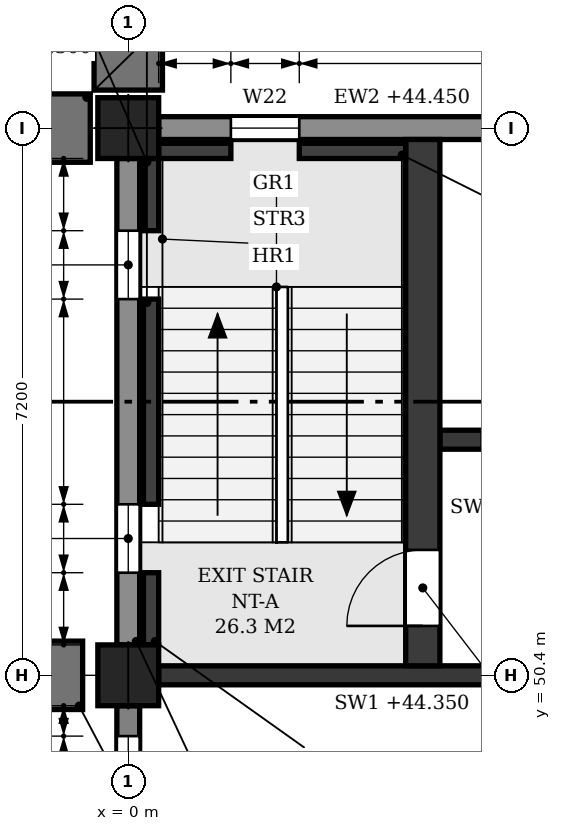
"""IFC4 building model, lengths in metres.
Left out: names, types, materials, properties, quantities, classifications, styles, units other than length and angle.
Written with IfcOpenShell. Run it as: python <this file> out.ifc"""

import sys

from ifc_helpers import new_model, si_unit, direction, frame, frame_2d, origin, origin_2d, place, context, subcontext, project, spatial, polyline, rectangle, outline, extrude, element, fill, save


model = new_model("IFC4")
c1 = context("Model", 3, precision=1e-05, world=origin(), true_north=direction((0.0, 1.0)))
c2 = subcontext(c1, "Body", "Model", "MODEL_VIEW")
j1 = project(units=[si_unit("LENGTHUNIT", "METRE"), si_unit("PLANEANGLEUNIT", "RADIAN")], contexts=[c1])
p1 = place(None, origin())
s1 = spatial("IfcSite", under=j1, at=p1, CompositionType="ELEMENT")
p2 = place(p1, origin())
s2 = spatial("IfcBuilding", under=s1, at=p2, CompositionType="ELEMENT")
p3 = place(p2, frame((0.0, 0.0, 40.8)))
s3 = spatial("IfcBuildingStorey", under=s2, at=p3, CompositionType="ELEMENT", Elevation=40.8)
for number, where, z_axis, x_axis in (
    (1, (0.0, 50.4, 0.0), (0.0, 0.0, 1.0), (1.0, 0.0, 0.0)),
    (2, (0.0, 57.6, 0.0), (0.0, 0.0, 1.0), (1.0, 0.0, 0.0)),
):
    element("IfcColumn", number, at=place(p3, frame(where, z_axis=z_axis, x_axis=x_axis)), inside=s3, PredefinedType="COLUMN", context=c2, shape_type="SweptSolid", body=[
        extrude(rectangle(XDim=0.8, YDim=0.8, at=origin_2d()), origin(), (0.0, 0.0, 1.0), 4.5),
    ])
p4 = place(p3, frame((0.0, 43.6, 0.0), z_axis=(0.0, 0.0, 1.0), x_axis=(0.0, 1.0, 0.0)))
e3 = element("IfcWall", 3, at=p4, inside=s3, PredefinedType="STANDARD", context=c2, shape_type="SweptSolid", body=[
    extrude(rectangle(XDim=6.4, YDim=0.3, at=frame_2d((3.2, 0.0))), origin(), (0.0, 0.0, 1.0), 3.65),
])
p5 = place(p4, frame((0.4, 0.0, 0.9)))
e4 = element("IfcOpeningElement", 4, at=p5, cuts=e3, PredefinedType="OPENING", context=c2, shape_type="SweptSolid", body=[
    extrude(outline(polyline([(0.0, 0.0), (0.85, 0.0), (0.85, 2.25), (0.425, 2.7), (0.0, 2.25), (0.0, 0.0)])), frame((0.0, 0.16, 0.0), z_axis=(0.0, -1.0, 0.0), x_axis=(1.0, 0.0, 0.0)), (0.0, 0.0, 1.0), 0.32),
])
p6 = place(p4, frame((1.55, 0.0, 0.9)))
e5 = element("IfcOpeningElement", 5, at=p6, cuts=e3, PredefinedType="OPENING", context=c2, shape_type="SweptSolid", body=[
    extrude(outline(polyline([(0.0, 0.0), (0.85, 0.0), (0.85, 2.25), (0.425, 2.7), (0.0, 2.25), (0.0, 0.0)])), frame((0.0, 0.16, 0.0), z_axis=(0.0, -1.0, 0.0), x_axis=(1.0, 0.0, 0.0)), (0.0, 0.0, 1.0), 0.32),
])
p7 = place(p4, frame((4.0, 0.0, 0.9)))
e6 = element("IfcOpeningElement", 6, at=p7, cuts=e3, PredefinedType="OPENING", context=c2, shape_type="SweptSolid", body=[
    extrude(outline(polyline([(0.0, 0.0), (0.85, 0.0), (0.85, 2.25), (0.425, 2.7), (0.0, 2.25), (0.0, 0.0)])), frame((0.0, 0.16, 0.0), z_axis=(0.0, -1.0, 0.0), x_axis=(1.0, 0.0, 0.0)), (0.0, 0.0, 1.0), 0.32),
])
p8 = place(p4, frame((5.15, 0.0, 0.9)))
e7 = element("IfcOpeningElement", 7, at=p8, cuts=e3, PredefinedType="OPENING", context=c2, shape_type="SweptSolid", body=[
    extrude(outline(polyline([(0.0, 0.0), (0.85, 0.0), (0.85, 2.25), (0.425, 2.7), (0.0, 2.25), (0.0, 0.0)])), frame((0.0, 0.16, 0.0), z_axis=(0.0, -1.0, 0.0), x_axis=(1.0, 0.0, 0.0)), (0.0, 0.0, 1.0), 0.32),
])
p9 = place(p3, frame((0.0, 50.8, 0.0), z_axis=(0.0, 0.0, 1.0), x_axis=(0.0, 1.0, 0.0)))
e8 = element("IfcWall", 8, at=p9, inside=s3, PredefinedType="STANDARD", context=c2, shape_type="SweptSolid", body=[
    extrude(rectangle(XDim=6.4, YDim=0.3, at=frame_2d((3.2, 0.0))), origin(), (0.0, 0.0, 1.0), 3.65),
])
p10 = place(p9, frame((0.95, 0.0, 0.9)))
e9 = element("IfcOpeningElement", 9, at=p10, cuts=e8, PredefinedType="OPENING", context=c2, shape_type="SweptSolid", body=[
    extrude(outline(polyline([(0.0, 0.0), (0.9, 0.0), (0.9, 2.25), (0.45, 2.7), (0.0, 2.25), (0.0, 0.0)])), frame((0.0, 0.16, 0.0), z_axis=(0.0, -1.0, 0.0), x_axis=(1.0, 0.0, 0.0)), (0.0, 0.0, 1.0), 0.32),
])
p11 = place(p9, frame((4.55, 0.0, 0.9)))
e10 = element("IfcOpeningElement", 10, at=p11, cuts=e8, PredefinedType="OPENING", context=c2, shape_type="SweptSolid", body=[
    extrude(outline(polyline([(0.0, 0.0), (0.9, 0.0), (0.9, 2.25), (0.45, 2.7), (0.0, 2.25), (0.0, 0.0)])), frame((0.0, 0.16, 0.0), z_axis=(0.0, -1.0, 0.0), x_axis=(1.0, 0.0, 0.0)), (0.0, 0.0, 1.0), 0.32),
])
p12 = place(p3, frame((6.8, 57.6, 0.0), z_axis=(0.0, 0.0, 1.0), x_axis=(-1.0, 0.0, 0.0)))
e11 = element("IfcWall", 11, at=p12, inside=s3, PredefinedType="STANDARD", context=c2, shape_type="SweptSolid", body=[
    extrude(rectangle(XDim=6.4, YDim=0.3, at=frame_2d((3.2, 0.0))), origin(), (0.0, 0.0, 1.0), 3.65),
])
p13 = place(p12, frame((4.55, 0.0, 0.9)))
e12 = element("IfcOpeningElement", 12, at=p13, cuts=e11, PredefinedType="OPENING", context=c2, shape_type="SweptSolid", body=[
    extrude(outline(polyline([(0.0, 0.0), (0.9, 0.0), (0.9, 2.25), (0.45, 2.7), (0.0, 2.25), (0.0, 0.0)])), frame((0.0, 0.16, 0.0), z_axis=(0.0, -1.0, 0.0), x_axis=(1.0, 0.0, 0.0)), (0.0, 0.0, 1.0), 0.32),
])
for number, where, z_axis, x_axis in (
    (13, (-0.6, 50.4, -0.25), (0.0, 0.0, 1.0), (-1.0, 0.0, 0.0)),
    (14, (-0.5, 57.6, -0.25), (0.0, 0.0, 1.0), (-1.0, 0.0, 0.0)),
    (15, (0.0, 58.1, -0.25), (0.0, 0.0, 1.0), (0.0, 1.0, 0.0)),
):
    element("IfcWall", number, at=place(p3, frame(where, z_axis=z_axis, x_axis=x_axis)), inside=s3, PredefinedType="POLYGONAL", context=c2, shape_type="SweptSolid", body=[
        extrude(outline(polyline([(1.1, 0.0), (1.1, 12.325), (0.15, 13.75), (0.0, 13.75), (0.0, 0.0), (1.1, 0.0)])), frame((0.0, 0.45, 0.0), z_axis=(0.0, -1.0, 0.0), x_axis=(1.0, 0.0, 0.0)), (0.0, 0.0, 1.0), 0.9),
    ])
p14 = place(p3, frame((0.4, 50.4, 0.0), z_axis=(0.0, 0.0, 1.0), x_axis=(1.0, 0.0, 0.0)))
e16 = element("IfcWall", 16, at=p14, inside=s3, PredefinedType="SHEAR", context=c2, shape_type="SweptSolid", body=[
    extrude(rectangle(XDim=6.4, YDim=0.25, at=frame_2d((3.2, 0.0))), origin(), (0.0, 0.0, 1.0), 3.55),
])
p15 = place(p14, frame((4.85, 0.0, 0.0)))
e17 = element("IfcOpeningElement", 17, at=p15, cuts=e16, PredefinedType="OPENING", context=c2, shape_type="SweptSolid", body=[
    extrude(rectangle(XDim=1.1, YDim=2.1, at=frame_2d((0.55, 1.05))), frame((0.0, 0.135, 0.0), z_axis=(0.0, -1.0, 0.0), x_axis=(1.0, 0.0, 0.0)), (0.0, 0.0, 1.0), 0.27),
])
p16 = place(p3, frame((0.3, 50.8, -0.25), z_axis=(0.0, 0.0, 1.0), x_axis=(0.0, 1.0, 0.0)))
e18 = element("IfcWall", 18, at=p16, inside=s3, PredefinedType="SHEAR", context=c2, shape_type="SweptSolid", body=[
    extrude(rectangle(XDim=0.95, YDim=0.2, at=frame_2d((0.475, 0.0))), origin(), (0.0, 0.0, 1.0), 4.5),
])
p17 = place(p3, frame((0.3, 52.65, -0.25), z_axis=(0.0, 0.0, 1.0), x_axis=(0.0, 1.0, 0.0)))
e19 = element("IfcWall", 19, at=p17, inside=s3, PredefinedType="SHEAR", context=c2, shape_type="SweptSolid", body=[
    extrude(rectangle(XDim=2.7, YDim=0.2, at=frame_2d((1.35, 0.0))), origin(), (0.0, 0.0, 1.0), 4.5),
])
p18 = place(p3, frame((0.3, 56.25, -0.25), z_axis=(0.0, 0.0, 1.0), x_axis=(0.0, 1.0, 0.0)))
e20 = element("IfcWall", 20, at=p18, inside=s3, PredefinedType="SHEAR", context=c2, shape_type="SweptSolid", body=[
    extrude(rectangle(XDim=0.95, YDim=0.2, at=frame_2d((0.475, 0.0))), origin(), (0.0, 0.0, 1.0), 4.5),
])
p19 = place(p3, frame((0.4, 57.3, -0.25), z_axis=(0.0, 0.0, 1.0), x_axis=(1.0, 0.0, 0.0)))
e21 = element("IfcWall", 21, at=p19, inside=s3, PredefinedType="SHEAR", context=c2, shape_type="SweptSolid", body=[
    extrude(rectangle(XDim=0.95, YDim=0.2, at=frame_2d((0.475, 0.0))), origin(), (0.0, 0.0, 1.0), 4.5),
])
p20 = place(p3, frame((2.25, 57.3, -0.25), z_axis=(0.0, 0.0, 1.0), x_axis=(1.0, 0.0, 0.0)))
e22 = element("IfcWall", 22, at=p20, inside=s3, PredefinedType="SHEAR", context=c2, shape_type="SweptSolid", body=[
    extrude(rectangle(XDim=1.4, YDim=0.2, at=frame_2d((0.7, 0.0))), origin(), (0.0, 0.0, 1.0), 4.5),
])
p21 = place(p3, frame((3.875, 50.525, 0.0), z_axis=(0.0, 0.0, 1.0), x_axis=(0.0, 1.0, 0.0)))
e23 = element("IfcWall", 23, at=p21, inside=s3, PredefinedType="SHEAR", context=c2, shape_type="SweptSolid", body=[
    extrude(rectangle(XDim=6.925, YDim=0.45, at=frame_2d((3.462, 0.0))), origin(), (0.0, 0.0, 1.0), 4.25),
])
p22 = place(p21, frame((0.525, 0.0, 0.0)))
e24 = element("IfcOpeningElement", 24, at=p22, cuts=e23, PredefinedType="OPENING", context=c2, shape_type="SweptSolid", body=[
    extrude(rectangle(XDim=1.0, YDim=2.1, at=frame_2d((0.5, 1.05))), frame((0.0, 0.235, 0.0), z_axis=(0.0, -1.0, 0.0), x_axis=(1.0, 0.0, 0.0)), (0.0, 0.0, 1.0), 0.47),
])
p23 = place(p3, frame((4.1, 53.5, 0.0), z_axis=(0.0, 0.0, 1.0), x_axis=(1.0, 0.0, 0.0)))
e25 = element("IfcWall", 25, at=p23, inside=s3, PredefinedType="SHEAR", context=c2, shape_type="SweptSolid", body=[
    extrude(rectangle(XDim=2.975, YDim=0.25, at=frame_2d((1.487, 0.0))), origin(), (0.0, 0.0, 1.0), 4.25),
])
p24 = place(p23, frame((0.55, 0.0, 0.0)))
e26 = element("IfcOpeningElement", 26, at=p24, cuts=e25, PredefinedType="OPENING", context=c2, shape_type="SweptSolid", body=[
    extrude(rectangle(XDim=0.9, YDim=2.1, at=frame_2d((0.45, 1.05))), frame((0.0, 0.135, 0.0), z_axis=(0.0, -1.0, 0.0), x_axis=(1.0, 0.0, 0.0)), (0.0, 0.0, 1.0), 0.27),
])
p25 = place(p13, origin())
e27 = element("IfcWindow", 27, at=p25, inside=s3, PartitioningType="SINGLE_PANEL", PredefinedType="WINDOW", context=c2, shape_type="SweptSolid", body=[
    extrude(outline(polyline([(0.0, 0.0), (0.9, 0.0), (0.9, 2.25), (0.45, 2.7), (0.0, 2.25), (0.0, 0.0)])), frame((0.0, 0.03, 0.0), z_axis=(0.0, -1.0, 0.0), x_axis=(1.0, 0.0, 0.0)), (0.0, 0.0, 1.0), 0.06),
])
fill(e12, e27)
p26 = place(p8, origin())
e28 = element("IfcWindow", 28, at=p26, inside=s3, PartitioningType="SINGLE_PANEL", PredefinedType="WINDOW", context=c2, shape_type="SweptSolid", body=[
    extrude(outline(polyline([(0.0, 0.0), (0.85, 0.0), (0.85, 2.25), (0.425, 2.7), (0.0, 2.25), (0.0, 0.0)])), frame((0.0, 0.03, 0.0), z_axis=(0.0, -1.0, 0.0), x_axis=(1.0, 0.0, 0.0)), (0.0, 0.0, 1.0), 0.06),
])
fill(e7, e28)
p27 = place(p10, origin())
e29 = element("IfcWindow", 29, at=p27, inside=s3, PartitioningType="SINGLE_PANEL", PredefinedType="WINDOW", context=c2, shape_type="SweptSolid", body=[
    extrude(outline(polyline([(0.0, 0.0), (0.9, 0.0), (0.9, 2.25), (0.45, 2.7), (0.0, 2.25), (0.0, 0.0)])), frame((0.0, 0.03, 0.0), z_axis=(0.0, -1.0, 0.0), x_axis=(1.0, 0.0, 0.0)), (0.0, 0.0, 1.0), 0.06),
])
fill(e9, e29)
p28 = place(p11, origin())
e30 = element("IfcWindow", 30, at=p28, inside=s3, PartitioningType="SINGLE_PANEL", PredefinedType="WINDOW", context=c2, shape_type="SweptSolid", body=[
    extrude(outline(polyline([(0.0, 0.0), (0.9, 0.0), (0.9, 2.25), (0.45, 2.7), (0.0, 2.25), (0.0, 0.0)])), frame((0.0, 0.03, 0.0), z_axis=(0.0, -1.0, 0.0), x_axis=(1.0, 0.0, 0.0)), (0.0, 0.0, 1.0), 0.06),
])
fill(e10, e30)
p29 = place(p22, origin())
e31 = element("IfcDoor", 31, at=p29, inside=s3, OperationType="SINGLE_SWING_LEFT", PredefinedType="DOOR", context=c2, shape_type="SweptSolid", body=[
    extrude(rectangle(XDim=1.0, YDim=2.1, at=frame_2d((0.5, 1.05))), frame((0.0, 0.025, 0.0), z_axis=(0.0, -1.0, 0.0), x_axis=(1.0, 0.0, 0.0)), (0.0, 0.0, 1.0), 0.05),
])
fill(e24, e31)
save(model, sys.argv[1])
